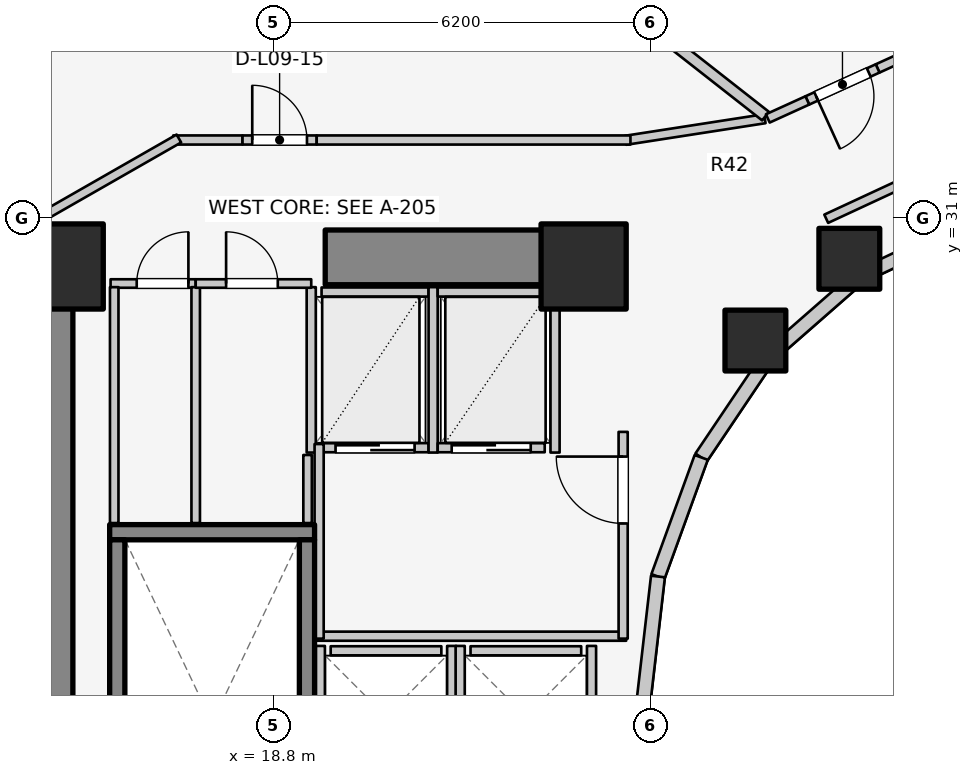
"""IFC4 building model, lengths in metres.
Left out: names, types, materials, properties, quantities, classifications, styles, units other than length and angle.
Written with IfcOpenShell. Run it as: python <this file> out.ifc"""

import sys

from ifc_helpers import new_model, si_unit, direction, frame, frame_2d, origin, origin_2d, place, context, subcontext, project, spatial, rectangle, extrude, element, fill, save


model = new_model("IFC4")
c1 = context("Model", 3, precision=1e-05, world=origin(), true_north=direction((0.0, 1.0)))
c2 = subcontext(c1, "Body", "Model", "MODEL_VIEW")
j1 = project(units=[si_unit("LENGTHUNIT", "METRE"), si_unit("PLANEANGLEUNIT", "RADIAN")], contexts=[c1])
p1 = place(None, origin())
s1 = spatial("IfcSite", under=j1, at=p1, CompositionType="ELEMENT")
p2 = place(p1, origin())
s2 = spatial("IfcBuilding", under=s1, at=p2, CompositionType="ELEMENT")
p3 = place(p2, frame((0.0, 0.0, 33.8)))
s3 = spatial("IfcBuildingStorey", under=s2, at=p3, CompositionType="ELEMENT", Elevation=33.8)
p4 = place(p3, frame((15.05, 17.05, 0.0), z_axis=(0.0, 0.0, 1.0), x_axis=(0.0, 1.0, 0.0)))
e1 = element("IfcWall", 1, at=p4, inside=s3, PredefinedType="SHEAR", context=c2, shape_type="SweptSolid", body=[
    extrude(rectangle(XDim=12.8, YDim=0.9, at=frame_2d((6.4, 0.0))), origin(), (0.0, 0.0, 1.0), 3.1),
])
p5 = place(p3, frame((19.65, 30.35, 0.0), z_axis=(0.0, 0.0, 1.0), x_axis=(1.0, 0.0, 0.0)))
e2 = element("IfcWall", 2, at=p5, inside=s3, PredefinedType="SHEAR", context=c2, shape_type="SweptSolid", body=[
    extrude(rectangle(XDim=4.5, YDim=0.9, at=frame_2d((2.25, 0.0))), origin(), (0.0, 0.0, 1.0), 3.1),
])
p6 = place(p3, frame((16.105, 25.83, 0.0), z_axis=(0.0, 0.0, 1.0), x_axis=(1.0, 0.0, 0.0)))
e3 = element("IfcWall", 3, at=p6, inside=s3, PredefinedType="SOLIDWALL", context=c2, shape_type="SweptSolid", body=[
    extrude(rectangle(XDim=3.37, YDim=0.25, at=frame_2d((1.685, 0.0))), origin(), (0.0, 0.0, 1.0), 3.1),
])
for number, where, z_axis, x_axis in (
    (4, (16.23, 17.895, 0.0), (0.0, 0.0, 1.0), (0.0, 1.0, 0.0)),
    (5, (19.35, 17.895, 0.0), (0.0, 0.0, 1.0), (0.0, 1.0, 0.0)),
):
    element("IfcWall", number, at=place(p3, frame(where, z_axis=z_axis, x_axis=x_axis)), inside=s3, PredefinedType="SOLIDWALL", context=c2, shape_type="SweptSolid", body=[
        extrude(rectangle(XDim=7.81, YDim=0.25, at=frame_2d((3.905, 0.0))), origin(), (0.0, 0.0, 1.0), 3.1),
    ])
for number, where, z_axis, x_axis in (
    (6, (23.9, 30.2, 0.0), (0.0, 0.0, 1.0), (1.0, 0.0, 0.0)),
    (7, (15.3, 30.2, 0.0), (0.0, 0.0, 1.0), (1.0, 0.0, 0.0)),
):
    element("IfcColumn", number, at=place(p3, frame(where, z_axis=z_axis, x_axis=x_axis)), inside=s3, PredefinedType="COLUMN", context=c2, shape_type="SweptSolid", body=[
        extrude(rectangle(XDim=1.4, YDim=1.4, at=origin_2d()), origin(), (0.0, 0.0, 1.0), 3.1),
    ])
for number, where, z_axis, x_axis in (
    (8, (28.27, 30.327, 0.0), (0.0, 0.0, 1.0), (1.0, 0.0, 0.0)),
    (9, (26.725, 28.982, 0.0), (0.0, 0.0, 1.0), (1.0, 0.0, 0.0)),
):
    element("IfcColumn", number, at=place(p3, frame(where, z_axis=z_axis, x_axis=x_axis)), inside=s3, PredefinedType="COLUMN", context=c2, shape_type="SweptSolid", body=[
        extrude(rectangle(XDim=1.0, YDim=1.0, at=origin_2d()), origin(), (0.0, 0.0, 1.0), 3.1),
    ])
p7 = place(p3, frame((30.157, 30.843, 0.0), z_axis=(0.0, 0.0, 1.0), x_axis=(-0.904179699603, -0.427152280606, 0.0)))
e10 = element("IfcWall", 10, at=p7, inside=s3, PredefinedType="STANDARD", context=c2, shape_type="SweptSolid", body=[
    extrude(rectangle(XDim=1.899, YDim=0.23, at=frame_2d((0.95, 0.0))), origin(), (0.0, 0.0, 1.0), 1.22),
])
p8 = place(p3, frame((28.44, 30.032, 0.0), z_axis=(0.0, 0.0, 1.0), x_axis=(-0.752576694707, -0.658504607869, 0.0)))
e11 = element("IfcWall", 11, at=p8, inside=s3, PredefinedType="STANDARD", context=c2, shape_type="SweptSolid", body=[
    extrude(rectangle(XDim=1.959, YDim=0.23, at=frame_2d((0.98, 0.0))), origin(), (0.0, 0.0, 1.0), 1.22),
])
p9 = place(p3, frame((26.965, 28.742, 0.0), z_axis=(0.0, 0.0, 1.0), x_axis=(-0.558197800898, -0.829707909492, 0.0)))
e12 = element("IfcWall", 12, at=p9, inside=s3, PredefinedType="STANDARD", context=c2, shape_type="SweptSolid", body=[
    extrude(rectangle(XDim=2.027, YDim=0.23, at=frame_2d((1.013, 0.0))), origin(), (0.0, 0.0, 1.0), 1.22),
])
p10 = place(p3, frame((25.834, 27.06, 0.0), z_axis=(0.0, 0.0, 1.0), x_axis=(-0.341423187295, -0.93990968033, 0.0)))
e13 = element("IfcWall", 13, at=p10, inside=s3, PredefinedType="STANDARD", context=c2, shape_type="SweptSolid", body=[
    extrude(rectangle(XDim=2.084, YDim=0.23, at=frame_2d((1.042, 0.0))), origin(), (0.0, 0.0, 1.0), 2.56),
])
p11 = place(p3, frame((25.123, 25.102, 0.0), z_axis=(0.0, 0.0, 1.0), x_axis=(-0.114711713601, -0.993398823617, 0.0)))
e14 = element("IfcWall", 14, at=p11, inside=s3, PredefinedType="STANDARD", context=c2, shape_type="SweptSolid", body=[
    extrude(rectangle(XDim=2.115, YDim=0.23, at=frame_2d((1.058, 0.0))), origin(), (0.0, 0.0, 1.0), 2.56),
])
p12 = place(p3, frame((19.74, 23.88, 0.0), z_axis=(0.0, 0.0, 1.0), x_axis=(1.0, 0.0, 0.0)))
e15 = element("IfcWall", 15, at=p12, inside=s3, PredefinedType="SOLIDWALL", context=c2, shape_type="SweptSolid", body=[
    extrude(rectangle(XDim=1.82, YDim=0.15, at=frame_2d((0.91, 0.0))), origin(), (0.0, 0.0, 1.0), 2.575),
])
for number, where, z_axis, x_axis in (
    (16, (19.57, 21.64, 0.0), (0.0, 0.0, 1.0), (0.0, 1.0, 0.0)),
    (17, (21.73, 21.64, 0.0), (0.0, 0.0, 1.0), (0.0, 1.0, 0.0)),
):
    element("IfcWall", number, at=place(p3, frame(where, z_axis=z_axis, x_axis=x_axis)), inside=s3, PredefinedType="SOLIDWALL", context=c2, shape_type="SweptSolid", body=[
        extrude(rectangle(XDim=2.32, YDim=0.15, at=frame_2d((1.16, 0.0))), origin(), (0.0, 0.0, 1.0), 2.575),
    ])
p13 = place(p3, frame((22.04, 23.88, 0.0), z_axis=(0.0, 0.0, 1.0), x_axis=(1.0, 0.0, 0.0)))
e18 = element("IfcWall", 18, at=p13, inside=s3, PredefinedType="SOLIDWALL", context=c2, shape_type="SweptSolid", body=[
    extrude(rectangle(XDim=1.82, YDim=0.15, at=frame_2d((0.91, 0.0))), origin(), (0.0, 0.0, 1.0), 2.12),
])
p14 = place(p3, frame((21.87, 21.64, 0.0), z_axis=(0.0, 0.0, 1.0), x_axis=(0.0, 1.0, 0.0)))
e19 = element("IfcWall", 19, at=p14, inside=s3, PredefinedType="SOLIDWALL", context=c2, shape_type="SweptSolid", body=[
    extrude(rectangle(XDim=2.32, YDim=0.15, at=frame_2d((1.16, 0.0))), origin(), (0.0, 0.0, 1.0), 2.575),
])
p15 = place(p3, frame((24.03, 21.64, 0.0), z_axis=(0.0, 0.0, 1.0), x_axis=(0.0, 1.0, 0.0)))
e20 = element("IfcWall", 20, at=p15, inside=s3, PredefinedType="SOLIDWALL", context=c2, shape_type="SweptSolid", body=[
    extrude(rectangle(XDim=2.32, YDim=0.15, at=frame_2d((1.16, 0.0))), origin(), (0.0, 0.0, 1.0), 2.12),
])
p16 = place(p3, frame((19.59, 27.22, 0.0), z_axis=(0.0, 0.0, 1.0), x_axis=(1.0, 0.0, 0.0)))
e21 = element("IfcWall", 21, at=p16, inside=s3, PredefinedType="SOLIDWALL", context=c2, shape_type="SweptSolid", body=[
    extrude(rectangle(XDim=1.76, YDim=0.15, at=frame_2d((0.88, 0.0))), origin(), (0.0, 0.0, 1.0), 2.575),
])
p17 = place(p16, frame((0.23, 0.0, 0.0)))
e22 = element("IfcOpeningElement", 22, at=p17, cuts=e21, PredefinedType="OPENING", context=c2, shape_type="SweptSolid", body=[
    extrude(rectangle(XDim=1.3, YDim=2.1, at=frame_2d((0.65, 1.05))), frame((0.0, 0.085, 0.0), z_axis=(0.0, -1.0, 0.0), x_axis=(1.0, 0.0, 0.0)), (0.0, 0.0, 1.0), 0.17),
])
p18 = place(p3, frame((19.59, 29.78, 0.0), z_axis=(0.0, 0.0, 1.0), x_axis=(1.0, 0.0, 0.0)))
e23 = element("IfcWall", 23, at=p18, inside=s3, PredefinedType="SOLIDWALL", context=c2, shape_type="SweptSolid", body=[
    extrude(rectangle(XDim=1.76, YDim=0.15, at=frame_2d((0.88, 0.0))), origin(), (0.0, 0.0, 1.0), 2.575),
])
for number, where, z_axis, x_axis in (
    (24, (19.42, 27.14, 0.0), (0.0, 0.0, 1.0), (0.0, 1.0, 0.0)),
    (25, (21.425, 27.14, 0.0), (0.0, 0.0, 1.0), (0.0, 1.0, 0.0)),
):
    element("IfcWall", number, at=place(p3, frame(where, z_axis=z_axis, x_axis=x_axis)), inside=s3, PredefinedType="SOLIDWALL", context=c2, shape_type="SweptSolid", body=[
        extrude(rectangle(XDim=2.72, YDim=0.15, at=frame_2d((1.36, 0.0))), origin(), (0.0, 0.0, 1.0), 2.575),
    ])
p19 = place(p3, frame((21.5, 27.22, 0.0), z_axis=(0.0, 0.0, 1.0), x_axis=(1.0, 0.0, 0.0)))
e26 = element("IfcWall", 26, at=p19, inside=s3, PredefinedType="SOLIDWALL", context=c2, shape_type="SweptSolid", body=[
    extrude(rectangle(XDim=1.76, YDim=0.15, at=frame_2d((0.88, 0.0))), origin(), (0.0, 0.0, 1.0), 2.575),
])
p20 = place(p19, frame((0.23, 0.0, 0.0)))
e27 = element("IfcOpeningElement", 27, at=p20, cuts=e26, PredefinedType="OPENING", context=c2, shape_type="SweptSolid", body=[
    extrude(rectangle(XDim=1.3, YDim=2.1, at=frame_2d((0.65, 1.05))), frame((0.0, 0.085, 0.0), z_axis=(0.0, -1.0, 0.0), x_axis=(1.0, 0.0, 0.0)), (0.0, 0.0, 1.0), 0.17),
])
p21 = place(p3, frame((21.5, 29.78, 0.0), z_axis=(0.0, 0.0, 1.0), x_axis=(1.0, 0.0, 0.0)))
e28 = element("IfcWall", 28, at=p21, inside=s3, PredefinedType="SOLIDWALL", context=c2, shape_type="SweptSolid", body=[
    extrude(rectangle(XDim=1.76, YDim=0.15, at=frame_2d((0.88, 0.0))), origin(), (0.0, 0.0, 1.0), 2.575),
])
p22 = place(p3, frame((23.43, 27.14, 0.0), z_axis=(0.0, 0.0, 1.0), x_axis=(0.0, 1.0, 0.0)))
e29 = element("IfcWall", 29, at=p22, inside=s3, PredefinedType="SOLIDWALL", context=c2, shape_type="SweptSolid", body=[
    extrude(rectangle(XDim=2.72, YDim=0.15, at=frame_2d((1.36, 0.0))), origin(), (0.0, 0.0, 1.0), 2.575),
])
p23 = place(p3, frame((19.52, 24.12, 0.0), z_axis=(0.0, 0.0, 1.0), x_axis=(1.0, 0.0, 0.0)))
e30 = element("IfcWall", 30, at=p23, inside=s3, PredefinedType="PARTITIONING", context=c2, shape_type="SweptSolid", body=[
    extrude(rectangle(XDim=5.08, YDim=0.15, at=frame_2d((2.54, 0.0))), origin(), (0.0, 0.0, 1.0), 2.12),
])
p24 = place(p3, frame((19.55, 24.08, 0.0), z_axis=(0.0, 0.0, 1.0), x_axis=(0.0, 1.0, 0.0)))
e31 = element("IfcWall", 31, at=p24, inside=s3, PredefinedType="PARTITIONING", context=c2, shape_type="SweptSolid", body=[
    extrude(rectangle(XDim=3.2, YDim=0.15, at=frame_2d((1.6, 0.0))), origin(), (0.0, 0.0, 1.0), 2.575),
])
p25 = place(p3, frame((24.55, 24.08, 0.0), z_axis=(0.0, 0.0, 1.0), x_axis=(0.0, 1.0, 0.0)))
e32 = element("IfcWall", 32, at=p25, inside=s3, PredefinedType="PARTITIONING", context=c2, shape_type="SweptSolid", body=[
    extrude(rectangle(XDim=3.4, YDim=0.15, at=frame_2d((1.7, 0.0))), origin(), (0.0, 0.0, 1.0), 2.575),
])
p26 = place(p25, frame((1.894, 0.0, 0.0)))
e33 = element("IfcOpeningElement", 33, at=p26, cuts=e32, PredefinedType="OPENING", context=c2, shape_type="SweptSolid", body=[
    extrude(rectangle(XDim=1.1, YDim=2.1, at=frame_2d((0.55, 1.05))), frame((0.0, 0.085, 0.0), z_axis=(0.0, -1.0, 0.0), x_axis=(1.0, 0.0, 0.0)), (0.0, 0.0, 1.0), 0.17),
])
p27 = place(p3, frame((16.12, 29.92, 0.0), z_axis=(0.0, 0.0, 1.0), x_axis=(1.0, 0.0, 0.0)))
e34 = element("IfcWall", 34, at=p27, inside=s3, PredefinedType="PLUMBINGWALL", context=c2, shape_type="SweptSolid", body=[
    extrude(rectangle(XDim=1.4, YDim=0.14, at=frame_2d((0.7, 0.0))), origin(), (0.0, 0.0, 1.0), 2.575),
])
p28 = place(p27, frame((0.43, 0.0, 0.0)))
e35 = element("IfcOpeningElement", 35, at=p28, cuts=e34, PredefinedType="OPENING", context=c2, shape_type="SweptSolid", body=[
    extrude(rectangle(XDim=0.85, YDim=2.05, at=frame_2d((0.425, 1.025))), frame((0.0, 0.08, 0.0), z_axis=(0.0, -1.0, 0.0), x_axis=(1.0, 0.0, 0.0)), (0.0, 0.0, 1.0), 0.16),
])
for number, where, z_axis, x_axis in (
    (36, (16.18, 25.98, 0.0), (0.0, 0.0, 1.0), (0.0, 1.0, 0.0)),
    (37, (17.52, 25.98, 0.0), (0.0, 0.0, 1.0), (0.0, 1.0, 0.0)),
):
    element("IfcWall", number, at=place(p3, frame(where, z_axis=z_axis, x_axis=x_axis)), inside=s3, PredefinedType="PLUMBINGWALL", context=c2, shape_type="SweptSolid", body=[
        extrude(rectangle(XDim=3.88, YDim=0.14, at=frame_2d((1.94, 0.0))), origin(), (0.0, 0.0, 1.0), 2.575),
    ])
p29 = place(p3, frame((17.52, 29.92, 0.0), z_axis=(0.0, 0.0, 1.0), x_axis=(1.0, 0.0, 0.0)))
e38 = element("IfcWall", 38, at=p29, inside=s3, PredefinedType="PLUMBINGWALL", context=c2, shape_type="SweptSolid", body=[
    extrude(rectangle(XDim=1.9, YDim=0.14, at=frame_2d((0.95, 0.0))), origin(), (0.0, 0.0, 1.0), 2.575),
])
p30 = place(p29, frame((0.5, 0.0, 0.0)))
e39 = element("IfcOpeningElement", 39, at=p30, cuts=e38, PredefinedType="OPENING", context=c2, shape_type="SweptSolid", body=[
    extrude(rectangle(XDim=0.85, YDim=2.05, at=frame_2d((0.425, 1.025))), frame((0.0, 0.08, 0.0), z_axis=(0.0, -1.0, 0.0), x_axis=(1.0, 0.0, 0.0)), (0.0, 0.0, 1.0), 0.16),
])
p31 = place(p3, frame((19.36, 25.98, 0.0), z_axis=(0.0, 0.0, 1.0), x_axis=(0.0, 1.0, 0.0)))
e40 = element("IfcWall", 40, at=p31, inside=s3, PredefinedType="PLUMBINGWALL", context=c2, shape_type="SweptSolid", body=[
    extrude(rectangle(XDim=1.12, YDim=0.14, at=frame_2d((0.56, 0.0))), origin(), (0.0, 0.0, 1.0), 2.575),
])
p32 = place(p3, frame((29.873, 31.906, 0.0), z_axis=(0.0, 0.0, 1.0), x_axis=(-0.906943449489, -0.421252393975, 0.0)))
e41 = element("IfcWall", 41, at=p32, inside=s3, PredefinedType="PARTITIONING", context=c2, shape_type="SweptSolid", body=[
    extrude(rectangle(XDim=2.186, YDim=0.15, at=frame_2d((1.093, 0.0))), origin(), (0.0, 0.0, 1.0), 1.957),
])
p33 = place(p3, frame((26.881, 32.631, 0.0), z_axis=(0.0, 0.0, 1.0), x_axis=(-0.988184633586, -0.153268163508, 0.0)))
e42 = element("IfcWall", 42, at=p33, inside=s3, PredefinedType="PARTITIONING", context=c2, shape_type="SweptSolid", body=[
    extrude(rectangle(XDim=2.318, YDim=0.15, at=frame_2d((1.159, 0.0))), origin(), (0.0, 0.0, 1.0), 1.957),
])
p34 = place(p3, frame((17.15, 32.28, 0.0), z_axis=(0.0, 0.0, 1.0), x_axis=(1.0, 0.0, 0.0)))
e43 = element("IfcWall", 43, at=p34, inside=s3, PredefinedType="PARTITIONING", context=c2, shape_type="SweptSolid", body=[
    extrude(rectangle(XDim=1.14, YDim=0.15, at=frame_2d((0.57, 0.0))), origin(), (0.0, 0.0, 1.0), 2.575),
])
p35 = place(p3, frame((18.29, 32.28, 0.0), z_axis=(0.0, 0.0, 1.0), x_axis=(1.0, 0.0, 0.0)))
e44 = element("IfcWall", 44, at=p35, inside=s3, PredefinedType="PARTITIONING", context=c2, shape_type="SweptSolid", body=[
    extrude(rectangle(XDim=1.22, YDim=0.15, at=frame_2d((0.61, 0.0))), origin(), (0.0, 0.0, 1.0), 2.575),
])
p36 = place(p35, frame((0.16, 0.0, 0.0)))
e45 = element("IfcOpeningElement", 45, at=p36, cuts=e44, PredefinedType="OPENING", context=c2, shape_type="SweptSolid", body=[
    extrude(rectangle(XDim=0.9, YDim=2.1, at=frame_2d((0.45, 1.05))), frame((0.0, 0.085, 0.0), z_axis=(0.0, -1.0, 0.0), x_axis=(1.0, 0.0, 0.0)), (0.0, 0.0, 1.0), 0.17),
])
p37 = place(p3, frame((19.51, 32.28, 0.0), z_axis=(0.0, 0.0, 1.0), x_axis=(1.0, 0.0, 0.0)))
e46 = element("IfcWall", 46, at=p37, inside=s3, PredefinedType="PARTITIONING", context=c2, shape_type="SweptSolid", body=[
    extrude(rectangle(XDim=5.16, YDim=0.15, at=frame_2d((2.58, 0.0))), origin(), (0.0, 0.0, 1.0), 1.957),
])
p38 = place(p3, frame((17.243, 32.305, 0.0), z_axis=(0.0, 0.0, 1.0), x_axis=(-0.867991349648, -0.496579315857, 0.0)))
e47 = element("IfcWall", 47, at=p38, inside=s3, PredefinedType="PARTITIONING", context=c2, shape_type="SweptSolid", body=[
    extrude(rectangle(XDim=2.567, YDim=0.15, at=frame_2d((1.283, 0.0))), origin(), (0.0, 0.0, 1.0), 1.22),
])
p39 = place(p3, frame((26.892, 32.673, 0.0), z_axis=(0.0, 0.0, 1.0), x_axis=(-0.78700868866, 0.616941912966, 0.0)))
e48 = element("IfcWall", 48, at=p39, inside=s3, PredefinedType="PARTITIONING", context=c2, shape_type="SweptSolid", body=[
    extrude(rectangle(XDim=10.583, YDim=0.18, at=frame_2d((5.292, 0.0))), origin(), (0.0, 0.0, 1.0), 1.957),
])
p40 = place(p3, frame((29.385, 33.753, 0.0), z_axis=(0.0, 0.0, 1.0), x_axis=(-0.910167389119, -0.414240659261, 0.0)))
e49 = element("IfcWall", 49, at=p40, inside=s3, PredefinedType="PARTITIONING", context=c2, shape_type="SweptSolid", body=[
    extrude(rectangle(XDim=0.714, YDim=0.15, at=frame_2d((0.357, 0.0))), origin(), (0.0, 0.0, 1.0), 1.957),
])
p41 = place(p3, frame((28.735, 33.457, 0.0), z_axis=(0.0, 0.0, 1.0), x_axis=(-0.910241350267, -0.414078113722, 0.0)))
e50 = element("IfcWall", 50, at=p41, inside=s3, PredefinedType="PARTITIONING", context=c2, shape_type="SweptSolid", body=[
    extrude(rectangle(XDim=1.27, YDim=0.15, at=frame_2d((0.635, 0.0))), origin(), (0.0, 0.0, 1.0), 2.16),
])
p42 = place(p41, frame((0.16, 0.0, 0.0)))
e51 = element("IfcOpeningElement", 51, at=p42, cuts=e50, PredefinedType="OPENING", context=c2, shape_type="SweptSolid", body=[
    extrude(rectangle(XDim=0.95, YDim=2.1, at=frame_2d((0.475, 1.05))), frame((0.0, 0.085, 0.0), z_axis=(0.0, -1.0, 0.0), x_axis=(1.0, 0.0, 0.0)), (0.0, 0.0, 1.0), 0.17),
])
p43 = place(p3, frame((27.579, 32.931, 0.0), z_axis=(0.0, 0.0, 1.0), x_axis=(-0.910108713425, -0.414369556976, 0.0)))
e52 = element("IfcWall", 52, at=p43, inside=s3, PredefinedType="PARTITIONING", context=c2, shape_type="SweptSolid", body=[
    extrude(rectangle(XDim=0.714, YDim=0.15, at=frame_2d((0.357, 0.0))), origin(), (0.0, 0.0, 1.0), 2.575),
])
p44 = place(p17, origin())
e53 = element("IfcDoor", 53, at=p44, inside=s3, OperationType="DOUBLE_DOOR_SLIDING", PredefinedType="DOOR", context=c2, shape_type="SweptSolid", body=[
    extrude(rectangle(XDim=1.3, YDim=2.1, at=frame_2d((0.65, 1.05))), frame((0.0, 0.025, 0.0), z_axis=(0.0, -1.0, 0.0), x_axis=(1.0, 0.0, 0.0)), (0.0, 0.0, 1.0), 0.05),
])
fill(e22, e53)
p45 = place(p20, origin())
e54 = element("IfcDoor", 54, at=p45, inside=s3, OperationType="DOUBLE_DOOR_SLIDING", PredefinedType="DOOR", context=c2, shape_type="SweptSolid", body=[
    extrude(rectangle(XDim=1.3, YDim=2.1, at=frame_2d((0.65, 1.05))), frame((0.0, 0.025, 0.0), z_axis=(0.0, -1.0, 0.0), x_axis=(1.0, 0.0, 0.0)), (0.0, 0.0, 1.0), 0.05),
])
fill(e27, e54)
p46 = place(p26, origin())
e55 = element("IfcDoor", 55, at=p46, inside=s3, OperationType="SINGLE_SWING_RIGHT", PredefinedType="DOOR", context=c2, shape_type="SweptSolid", body=[
    extrude(rectangle(XDim=1.1, YDim=2.1, at=frame_2d((0.55, 1.05))), frame((0.0, 0.025, 0.0), z_axis=(0.0, -1.0, 0.0), x_axis=(1.0, 0.0, 0.0)), (0.0, 0.0, 1.0), 0.05),
])
fill(e33, e55)
p47 = place(p28, origin())
e56 = element("IfcDoor", 56, at=p47, inside=s3, OperationType="SINGLE_SWING_RIGHT", PredefinedType="DOOR", context=c2, shape_type="SweptSolid", body=[
    extrude(rectangle(XDim=0.85, YDim=2.05, at=frame_2d((0.425, 1.025))), frame((0.0, 0.025, 0.0), z_axis=(0.0, -1.0, 0.0), x_axis=(1.0, 0.0, 0.0)), (0.0, 0.0, 1.0), 0.05),
])
fill(e35, e56)
p48 = place(p30, origin())
e57 = element("IfcDoor", 57, at=p48, inside=s3, OperationType="SINGLE_SWING_LEFT", PredefinedType="DOOR", context=c2, shape_type="SweptSolid", body=[
    extrude(rectangle(XDim=0.85, YDim=2.05, at=frame_2d((0.425, 1.025))), frame((0.0, 0.025, 0.0), z_axis=(0.0, -1.0, 0.0), x_axis=(1.0, 0.0, 0.0)), (0.0, 0.0, 1.0), 0.05),
])
fill(e39, e57)
p49 = place(p36, origin())
e58 = element("IfcDoor", 58, at=p49, inside=s3, OperationType="SINGLE_SWING_LEFT", PredefinedType="DOOR", context=c2, shape_type="SweptSolid", body=[
    extrude(rectangle(XDim=0.9, YDim=2.1, at=frame_2d((0.45, 1.05))), frame((0.0, 0.025, 0.0), z_axis=(0.0, -1.0, 0.0), x_axis=(1.0, 0.0, 0.0)), (0.0, 0.0, 1.0), 0.05),
])
fill(e45, e58)
p50 = place(p42, origin())
e59 = element("IfcDoor", 59, at=p50, inside=s3, OperationType="SINGLE_SWING_RIGHT", PredefinedType="DOOR", context=c2, shape_type="SweptSolid", body=[
    extrude(rectangle(XDim=0.95, YDim=2.1, at=frame_2d((0.475, 1.05))), frame((0.0, 0.025, 0.0), z_axis=(0.0, -1.0, 0.0), x_axis=(1.0, 0.0, 0.0)), (0.0, 0.0, 1.0), 0.05),
])
fill(e51, e59)
save(model, sys.argv[1])
